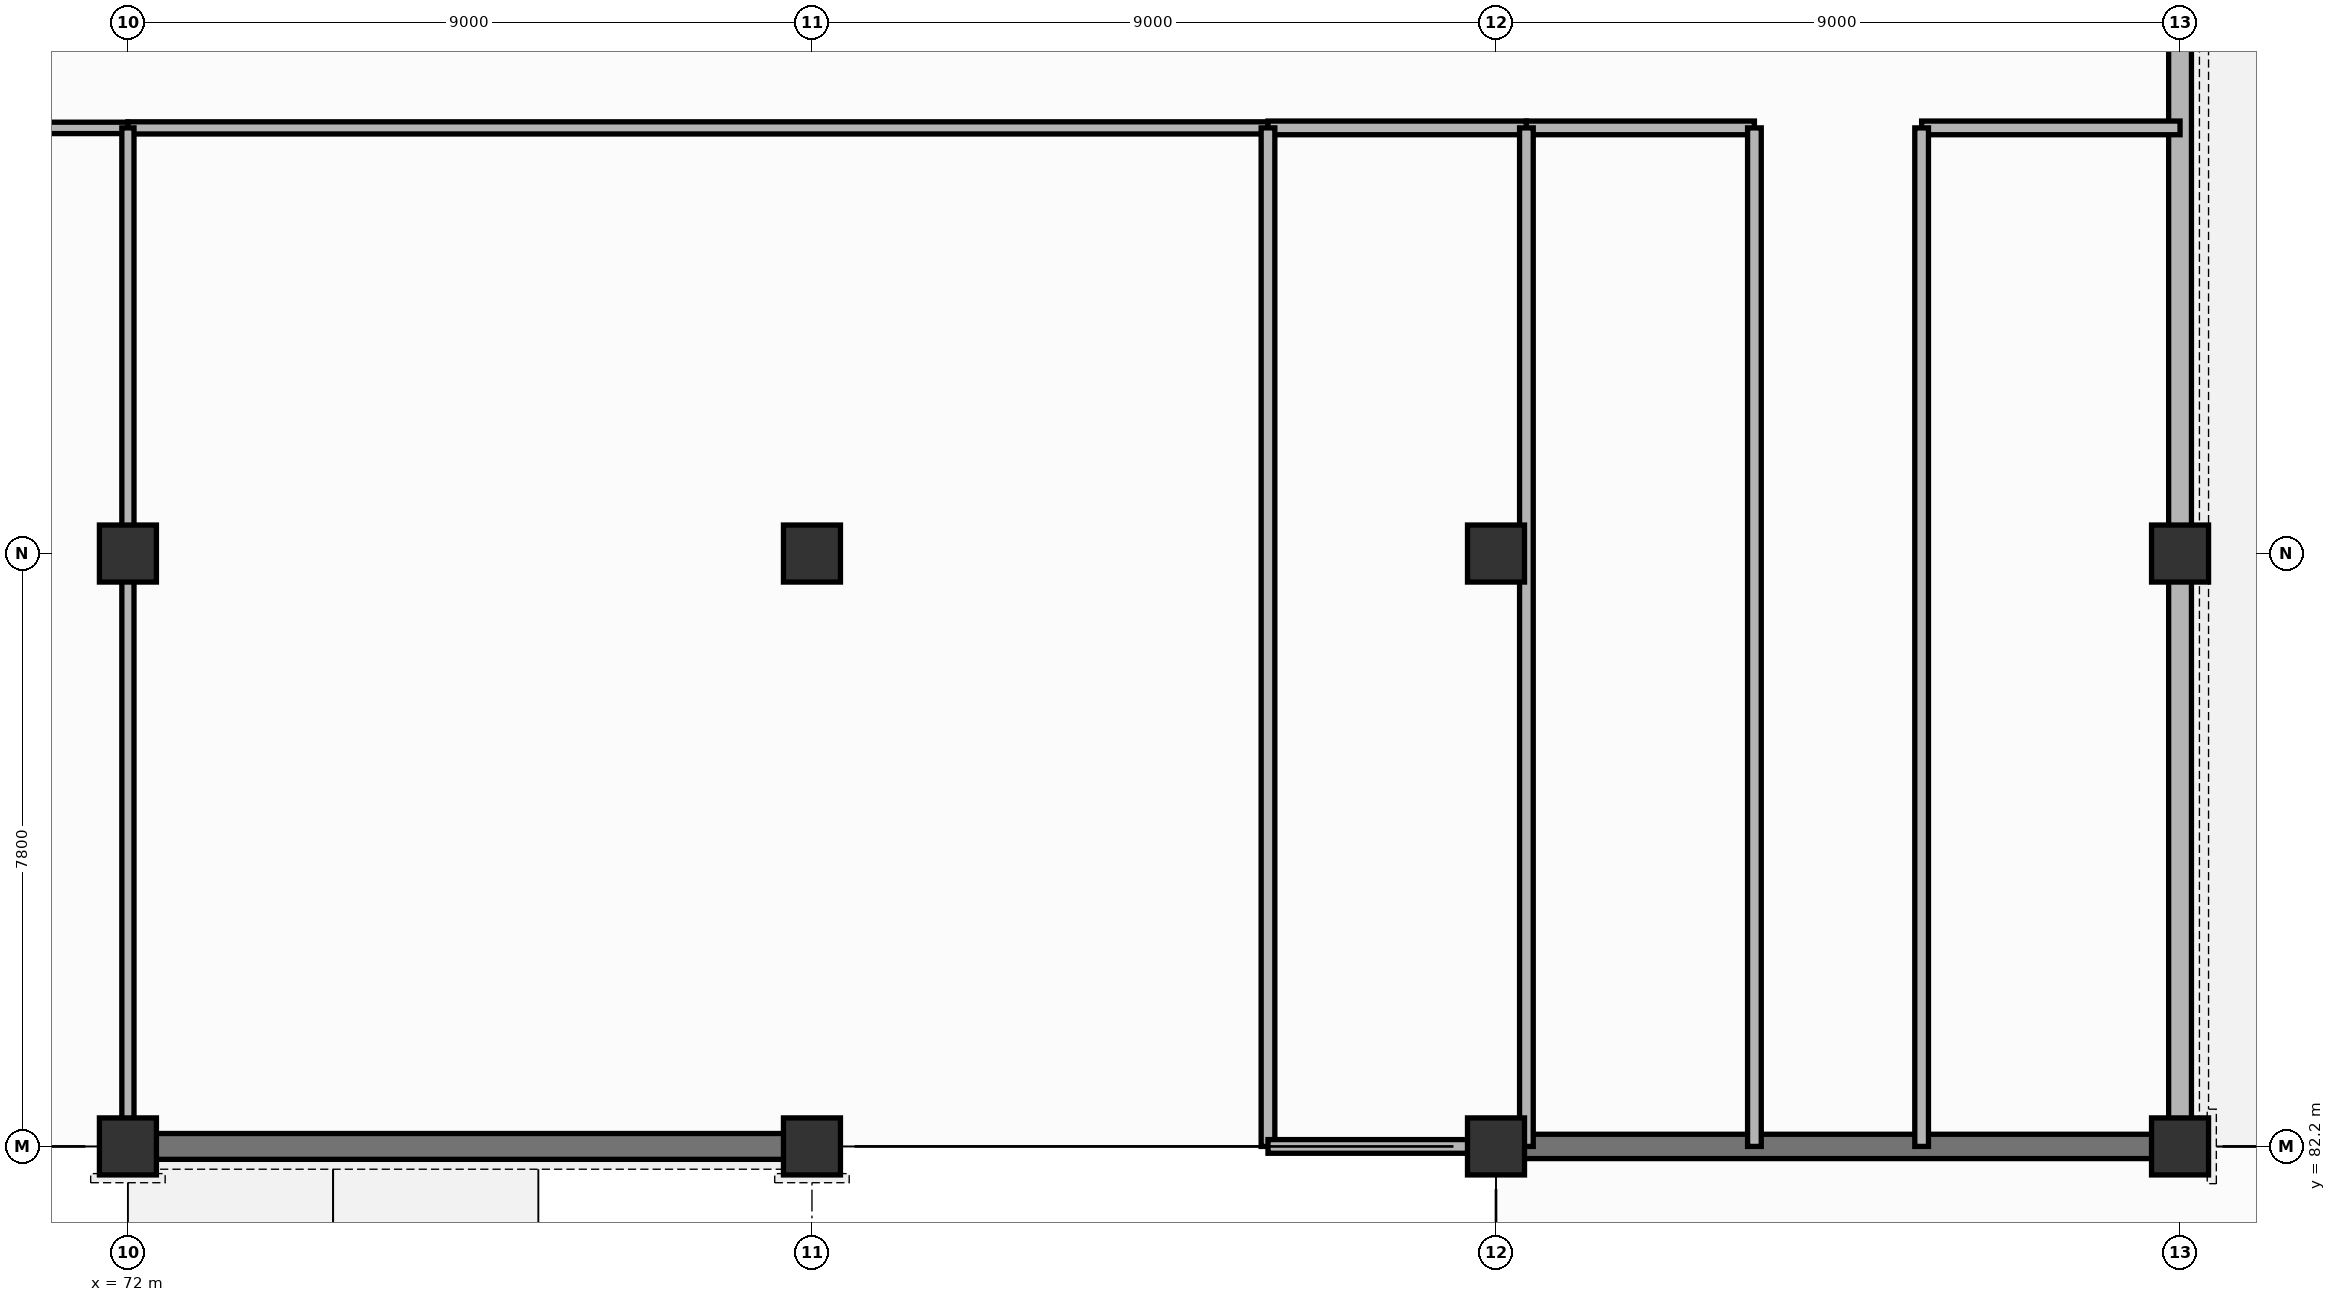
"""IFC4 building model, lengths in metres.
Left out: names, types, materials, properties, quantities, classifications, styles, units other than length and angle.
Written with IfcOpenShell. Run it as: python <this file> out.ifc"""

import sys

from ifc_helpers import new_model, si_unit, direction, frame, frame_2d, origin, origin_2d, place, context, subcontext, project, spatial, rectangle, extrude, element, fill, save


model = new_model("IFC4")
c1 = context("Model", 3, precision=1e-05, world=origin(), true_north=direction((0.0, 1.0)))
c2 = subcontext(c1, "Body", "Model", "MODEL_VIEW")
j1 = project(units=[si_unit("LENGTHUNIT", "METRE"), si_unit("PLANEANGLEUNIT", "RADIAN")], contexts=[c1])
p1 = place(None, origin())
s1 = spatial("IfcSite", under=j1, at=p1, CompositionType="ELEMENT")
p2 = place(p1, origin())
s2 = spatial("IfcBuilding", under=s1, at=p2, CompositionType="ELEMENT")
p3 = place(p2, frame((0.0, 0.0, 8.94)))
s3 = spatial("IfcBuildingStorey", under=s2, at=p3, CompositionType="ELEMENT", Elevation=8.94)
for number, where, z_axis, x_axis in (
    (1, (72.0, 82.2, 0.0), (0.0, 0.0, 1.0), (1.0, 0.0, 0.0)),
    (2, (72.0, 90.0, 0.0), (0.0, 0.0, 1.0), (1.0, 0.0, 0.0)),
    (3, (81.0, 82.2, 0.0), (0.0, 0.0, 1.0), (1.0, 0.0, 0.0)),
    (4, (81.0, 90.0, 0.0), (0.0, 0.0, 1.0), (1.0, 0.0, 0.0)),
    (5, (90.0, 82.2, 0.0), (0.0, 0.0, 1.0), (1.0, 0.0, 0.0)),
    (6, (90.0, 90.0, 0.0), (0.0, 0.0, 1.0), (1.0, 0.0, 0.0)),
    (7, (99.0, 82.2, 0.0), (0.0, 0.0, 1.0), (1.0, 0.0, 0.0)),
    (8, (99.0, 90.0, 0.0), (0.0, 0.0, 1.0), (1.0, 0.0, 0.0)),
):
    element("IfcColumn", number, at=place(p3, frame(where, z_axis=z_axis, x_axis=x_axis)), inside=s3, PredefinedType="COLUMN", context=c2, shape_type="SweptSolid", body=[
        extrude(rectangle(XDim=0.75, YDim=0.75, at=origin_2d()), origin(), (0.0, 0.0, 1.0), 3.84),
    ])
p4 = place(p3, frame((72.0, 82.2, 0.0), z_axis=(0.0, 0.0, 1.0), x_axis=(1.0, 0.0, 0.0)))
e9 = element("IfcWall", 9, at=p4, inside=s3, PredefinedType="SOLIDWALL", context=c2, shape_type="SweptSolid", body=[
    extrude(rectangle(XDim=9.0, YDim=0.34, at=frame_2d((4.5, 0.0))), origin(), (0.0, 0.0, 1.0), 3.53),
])
p5 = place(p4, frame((1.8, 0.0, 0.665)))
e10 = element("IfcOpeningElement", 10, at=p5, cuts=e9, PredefinedType="OPENING", context=c2, shape_type="SweptSolid", body=[
    extrude(rectangle(XDim=1.5, YDim=2.1, at=frame_2d((0.75, 1.05))), frame((0.0, 0.18, 0.0), z_axis=(0.0, -1.0, 0.0), x_axis=(1.0, 0.0, 0.0)), (0.0, 0.0, 1.0), 0.36),
])
p6 = place(p4, frame((5.4, 0.0, 0.665)))
e11 = element("IfcOpeningElement", 11, at=p6, cuts=e9, PredefinedType="OPENING", context=c2, shape_type="SweptSolid", body=[
    extrude(rectangle(XDim=1.2, YDim=2.1, at=frame_2d((0.6, 1.05))), frame((0.0, 0.18, 0.0), z_axis=(0.0, -1.0, 0.0), x_axis=(1.0, 0.0, 0.0)), (0.0, 0.0, 1.0), 0.36),
])
p7 = place(p3, frame((99.0, 82.2, 0.0), z_axis=(0.0, 0.0, 1.0), x_axis=(0.0, 1.0, 0.0)))
e12 = element("IfcWall", 12, at=p7, inside=s3, PredefinedType="SOLIDWALL", context=c2, shape_type="SweptSolid", body=[
    extrude(rectangle(XDim=31.8, YDim=0.3, at=frame_2d((15.9, 0.0))), origin(), (0.0, 0.0, 1.0), 2.695),
])
p8 = place(p7, frame((18.2, 0.0, 0.0)))
e13 = element("IfcOpeningElement", 13, at=p8, cuts=e12, PredefinedType="OPENING", context=c2, shape_type="SweptSolid", body=[
    extrude(rectangle(XDim=1.6, YDim=2.25, at=frame_2d((0.8, 1.125))), frame((0.0, 0.16, 0.0), z_axis=(0.0, -1.0, 0.0), x_axis=(1.0, 0.0, 0.0)), (0.0, 0.0, 1.0), 0.32),
])
p9 = place(p7, frame((3.2, 0.0, 0.475)))
e14 = element("IfcOpeningElement", 14, at=p9, cuts=e12, PredefinedType="OPENING", context=c2, shape_type="SweptSolid", body=[
    extrude(rectangle(XDim=1.5, YDim=2.1, at=frame_2d((0.75, 1.05))), frame((0.0, 0.16, 0.0), z_axis=(0.0, -1.0, 0.0), x_axis=(1.0, 0.0, 0.0)), (0.0, 0.0, 1.0), 0.32),
])
p10 = place(p7, frame((9.2, 0.0, 0.825)))
e15 = element("IfcOpeningElement", 15, at=p10, cuts=e12, PredefinedType="OPENING", context=c2, shape_type="SweptSolid", body=[
    extrude(rectangle(XDim=1.05, YDim=1.75, at=frame_2d((0.525, 0.875))), frame((0.0, 0.16, 0.0), z_axis=(0.0, -1.0, 0.0), x_axis=(1.0, 0.0, 0.0)), (0.0, 0.0, 1.0), 0.32),
])
p11 = place(p3, frame((90.0, 82.2, 0.0), z_axis=(0.0, 0.0, 1.0), x_axis=(1.0, 0.0, 0.0)))
e16 = element("IfcWall", 16, at=p11, inside=s3, PredefinedType="SHEAR", context=c2, shape_type="SweptSolid", body=[
    extrude(rectangle(XDim=9.0, YDim=0.32, at=frame_2d((4.5, 0.0))), origin(), (0.0, 0.0, 1.0), 3.53),
])
p12 = place(p11, frame((3.55, 0.0, 0.0)))
e17 = element("IfcOpeningElement", 17, at=p12, cuts=e16, PredefinedType="OPENING", context=c2, shape_type="SweptSolid", body=[
    extrude(rectangle(XDim=1.5, YDim=2.2, at=frame_2d((0.75, 1.1))), frame((0.0, 0.17, 0.0), z_axis=(0.0, -1.0, 0.0), x_axis=(1.0, 0.0, 0.0)), (0.0, 0.0, 1.0), 0.34),
])
p13 = place(p3, frame((54.0, 95.6, 0.0), z_axis=(0.0, 0.0, 1.0), x_axis=(1.0, 0.0, 0.0)))
e18 = element("IfcWall", 18, at=p13, inside=s3, PredefinedType="PARTITIONING", context=c2, shape_type="SweptSolid", body=[
    extrude(rectangle(XDim=18.0, YDim=0.15, at=frame_2d((9.0, 0.0))), origin(), (0.0, 0.0, 1.0), 2.705),
])
p14 = place(p13, frame((8.5, 0.0, 0.0)))
e19 = element("IfcOpeningElement", 19, at=p14, cuts=e18, PredefinedType="OPENING", context=c2, shape_type="SweptSolid", body=[
    extrude(rectangle(XDim=1.6, YDim=2.2, at=frame_2d((0.8, 1.1))), frame((0.0, 0.085, 0.0), z_axis=(0.0, -1.0, 0.0), x_axis=(1.0, 0.0, 0.0)), (0.0, 0.0, 1.0), 0.17),
])
p15 = place(p3, frame((72.0, 95.6, 0.0), z_axis=(0.0, 0.0, 1.0), x_axis=(1.0, 0.0, 0.0)))
e20 = element("IfcWall", 20, at=p15, inside=s3, PredefinedType="PARTITIONING", context=c2, shape_type="SweptSolid", body=[
    extrude(rectangle(XDim=15.0, YDim=0.16, at=frame_2d((7.5, 0.0))), origin(), (0.0, 0.0, 1.0), 2.705),
])
p16 = place(p15, frame((7.0, 0.0, 0.0)))
e21 = element("IfcOpeningElement", 21, at=p16, cuts=e20, PredefinedType="OPENING", context=c2, shape_type="SweptSolid", body=[
    extrude(rectangle(XDim=1.6, YDim=2.2, at=frame_2d((0.8, 1.1))), frame((0.0, 0.09, 0.0), z_axis=(0.0, -1.0, 0.0), x_axis=(1.0, 0.0, 0.0)), (0.0, 0.0, 1.0), 0.18),
])
p17 = place(p3, frame((72.0, 82.2, 0.0), z_axis=(0.0, 0.0, 1.0), x_axis=(0.0, 1.0, 0.0)))
e22 = element("IfcWall", 22, at=p17, inside=s3, PredefinedType="PARTITIONING", context=c2, shape_type="SweptSolid", body=[
    extrude(rectangle(XDim=13.4, YDim=0.16, at=frame_2d((6.7, 0.0))), origin(), (0.0, 0.0, 1.0), 2.805),
])
p18 = place(p3, frame((87.0, 95.6, 0.0), z_axis=(0.0, 0.0, 1.0), x_axis=(1.0, 0.0, 0.0)))
e23 = element("IfcWall", 23, at=p18, inside=s3, PredefinedType="PLUMBINGWALL", context=c2, shape_type="SweptSolid", body=[
    extrude(rectangle(XDim=3.4, YDim=0.18, at=frame_2d((1.7, 0.0))), origin(), (0.0, 0.0, 1.0), 3.53),
])
p19 = place(p18, frame((1.2, 0.0, 0.0)))
e24 = element("IfcOpeningElement", 24, at=p19, cuts=e23, PredefinedType="OPENING", context=c2, shape_type="SweptSolid", body=[
    extrude(rectangle(XDim=0.95, YDim=2.15, at=frame_2d((0.475, 1.075))), frame((0.0, 0.1, 0.0), z_axis=(0.0, -1.0, 0.0), x_axis=(1.0, 0.0, 0.0)), (0.0, 0.0, 1.0), 0.2),
])
p20 = place(p3, frame((87.0, 82.2, 0.0), z_axis=(0.0, 0.0, 1.0), x_axis=(0.0, 1.0, 0.0)))
e25 = element("IfcWall", 25, at=p20, inside=s3, PredefinedType="PLUMBINGWALL", context=c2, shape_type="SweptSolid", body=[
    extrude(rectangle(XDim=13.4, YDim=0.18, at=frame_2d((6.7, 0.0))), origin(), (0.0, 0.0, 1.0), 3.53),
])
p21 = place(p3, frame((90.4, 95.6, 0.0), z_axis=(0.0, 0.0, 1.0), x_axis=(1.0, 0.0, 0.0)))
e26 = element("IfcWall", 26, at=p21, inside=s3, PredefinedType="PLUMBINGWALL", context=c2, shape_type="SweptSolid", body=[
    extrude(rectangle(XDim=3.0, YDim=0.18, at=frame_2d((1.5, 0.0))), origin(), (0.0, 0.0, 1.0), 3.53),
])
p22 = place(p21, frame((1.0, 0.0, 0.0)))
e27 = element("IfcOpeningElement", 27, at=p22, cuts=e26, PredefinedType="OPENING", context=c2, shape_type="SweptSolid", body=[
    extrude(rectangle(XDim=0.95, YDim=2.15, at=frame_2d((0.475, 1.075))), frame((0.0, 0.1, 0.0), z_axis=(0.0, -1.0, 0.0), x_axis=(1.0, 0.0, 0.0)), (0.0, 0.0, 1.0), 0.2),
])
for number, where, z_axis, x_axis in (
    (28, (90.4, 82.2, 0.0), (0.0, 0.0, 1.0), (0.0, 1.0, 0.0)),
    (29, (93.4, 82.2, 0.0), (0.0, 0.0, 1.0), (0.0, 1.0, 0.0)),
):
    element("IfcWall", number, at=place(p3, frame(where, z_axis=z_axis, x_axis=x_axis)), inside=s3, PredefinedType="PLUMBINGWALL", context=c2, shape_type="SweptSolid", body=[
        extrude(rectangle(XDim=13.4, YDim=0.18, at=frame_2d((6.7, 0.0))), origin(), (0.0, 0.0, 1.0), 3.53),
    ])
p23 = place(p3, frame((95.6, 95.6, 0.0), z_axis=(0.0, 0.0, 1.0), x_axis=(1.0, 0.0, 0.0)))
e30 = element("IfcWall", 30, at=p23, inside=s3, PredefinedType="PLUMBINGWALL", context=c2, shape_type="SweptSolid", body=[
    extrude(rectangle(XDim=3.4, YDim=0.18, at=frame_2d((1.7, 0.0))), origin(), (0.0, 0.0, 1.0), 3.53),
])
p24 = place(p23, frame((1.2, 0.0, 0.0)))
e31 = element("IfcOpeningElement", 31, at=p24, cuts=e30, PredefinedType="OPENING", context=c2, shape_type="SweptSolid", body=[
    extrude(rectangle(XDim=0.95, YDim=2.15, at=frame_2d((0.475, 1.075))), frame((0.0, 0.1, 0.0), z_axis=(0.0, -1.0, 0.0), x_axis=(1.0, 0.0, 0.0)), (0.0, 0.0, 1.0), 0.2),
])
p25 = place(p3, frame((95.6, 82.2, 0.0), z_axis=(0.0, 0.0, 1.0), x_axis=(0.0, 1.0, 0.0)))
e32 = element("IfcWall", 32, at=p25, inside=s3, PredefinedType="PLUMBINGWALL", context=c2, shape_type="SweptSolid", body=[
    extrude(rectangle(XDim=13.4, YDim=0.18, at=frame_2d((6.7, 0.0))), origin(), (0.0, 0.0, 1.0), 3.53),
])
p26 = place(p3, frame((87.0, 82.2, 0.0), z_axis=(0.0, 0.0, 1.0), x_axis=(1.0, 0.0, 0.0)))
e33 = element("IfcWall", 33, at=p26, inside=s3, PredefinedType="PLUMBINGWALL", context=c2, shape_type="SweptSolid", body=[
    extrude(rectangle(XDim=3.0, YDim=0.18, at=frame_2d((1.5, 0.0))), origin(), (0.0, 0.0, 1.0), 2.805),
])
p27 = place(p5, origin())
e34 = element("IfcWindow", 34, at=p27, inside=s3, PartitioningType="SINGLE_PANEL", PredefinedType="WINDOW", context=c2, shape_type="SweptSolid", body=[
    extrude(rectangle(XDim=1.5, YDim=2.1, at=frame_2d((0.75, 1.05))), frame((0.0, 0.03, 0.0), z_axis=(0.0, -1.0, 0.0), x_axis=(1.0, 0.0, 0.0)), (0.0, 0.0, 1.0), 0.06),
])
fill(e10, e34)
p28 = place(p6, origin())
e35 = element("IfcWindow", 35, at=p28, inside=s3, PartitioningType="SINGLE_PANEL", PredefinedType="WINDOW", context=c2, shape_type="SweptSolid", body=[
    extrude(rectangle(XDim=1.2, YDim=2.1, at=frame_2d((0.6, 1.05))), frame((0.0, 0.03, 0.0), z_axis=(0.0, -1.0, 0.0), x_axis=(1.0, 0.0, 0.0)), (0.0, 0.0, 1.0), 0.06),
])
fill(e11, e35)
p29 = place(p9, origin())
e36 = element("IfcWindow", 36, at=p29, inside=s3, PartitioningType="SINGLE_PANEL", PredefinedType="WINDOW", context=c2, shape_type="SweptSolid", body=[
    extrude(rectangle(XDim=1.5, YDim=2.1, at=frame_2d((0.75, 1.05))), frame((0.0, 0.03, 0.0), z_axis=(0.0, -1.0, 0.0), x_axis=(1.0, 0.0, 0.0)), (0.0, 0.0, 1.0), 0.06),
])
fill(e14, e36)
p30 = place(p10, origin())
e37 = element("IfcWindow", 37, at=p30, inside=s3, PartitioningType="SINGLE_PANEL", PredefinedType="WINDOW", context=c2, shape_type="SweptSolid", body=[
    extrude(rectangle(XDim=1.05, YDim=1.75, at=frame_2d((0.525, 0.875))), frame((0.0, 0.03, 0.0), z_axis=(0.0, -1.0, 0.0), x_axis=(1.0, 0.0, 0.0)), (0.0, 0.0, 1.0), 0.06),
])
fill(e15, e37)
p31 = place(p12, origin())
e38 = element("IfcDoor", 38, at=p31, inside=s3, OperationType="DOUBLE_DOOR_SINGLE_SWING", PredefinedType="DOOR", context=c2, shape_type="SweptSolid", body=[
    extrude(rectangle(XDim=1.5, YDim=2.2, at=frame_2d((0.75, 1.1))), frame((0.0, 0.025, 0.0), z_axis=(0.0, -1.0, 0.0), x_axis=(1.0, 0.0, 0.0)), (0.0, 0.0, 1.0), 0.05),
])
fill(e17, e38)
p32 = place(p16, origin())
e39 = element("IfcDoor", 39, at=p32, inside=s3, OperationType="DOUBLE_DOOR_SINGLE_SWING", PredefinedType="DOOR", context=c2, shape_type="SweptSolid", body=[
    extrude(rectangle(XDim=1.6, YDim=2.2, at=frame_2d((0.8, 1.1))), frame((0.0, 0.025, 0.0), z_axis=(0.0, -1.0, 0.0), x_axis=(1.0, 0.0, 0.0)), (0.0, 0.0, 1.0), 0.05),
])
fill(e21, e39)
p33 = place(p19, origin())
e40 = element("IfcDoor", 40, at=p33, inside=s3, OperationType="SINGLE_SWING_RIGHT", PredefinedType="DOOR", context=c2, shape_type="SweptSolid", body=[
    extrude(rectangle(XDim=0.95, YDim=2.15, at=frame_2d((0.475, 1.075))), frame((0.0, 0.025, 0.0), z_axis=(0.0, -1.0, 0.0), x_axis=(1.0, 0.0, 0.0)), (0.0, 0.0, 1.0), 0.05),
])
fill(e24, e40)
p34 = place(p22, origin())
e41 = element("IfcDoor", 41, at=p34, inside=s3, OperationType="SINGLE_SWING_LEFT", PredefinedType="DOOR", context=c2, shape_type="SweptSolid", body=[
    extrude(rectangle(XDim=0.95, YDim=2.15, at=frame_2d((0.475, 1.075))), frame((0.0, 0.025, 0.0), z_axis=(0.0, -1.0, 0.0), x_axis=(1.0, 0.0, 0.0)), (0.0, 0.0, 1.0), 0.05),
])
fill(e27, e41)
p35 = place(p24, origin())
e42 = element("IfcDoor", 42, at=p35, inside=s3, OperationType="SINGLE_SWING_RIGHT", PredefinedType="DOOR", context=c2, shape_type="SweptSolid", body=[
    extrude(rectangle(XDim=0.95, YDim=2.15, at=frame_2d((0.475, 1.075))), frame((0.0, 0.025, 0.0), z_axis=(0.0, -1.0, 0.0), x_axis=(1.0, 0.0, 0.0)), (0.0, 0.0, 1.0), 0.05),
])
fill(e31, e42)
save(model, sys.argv[1])
